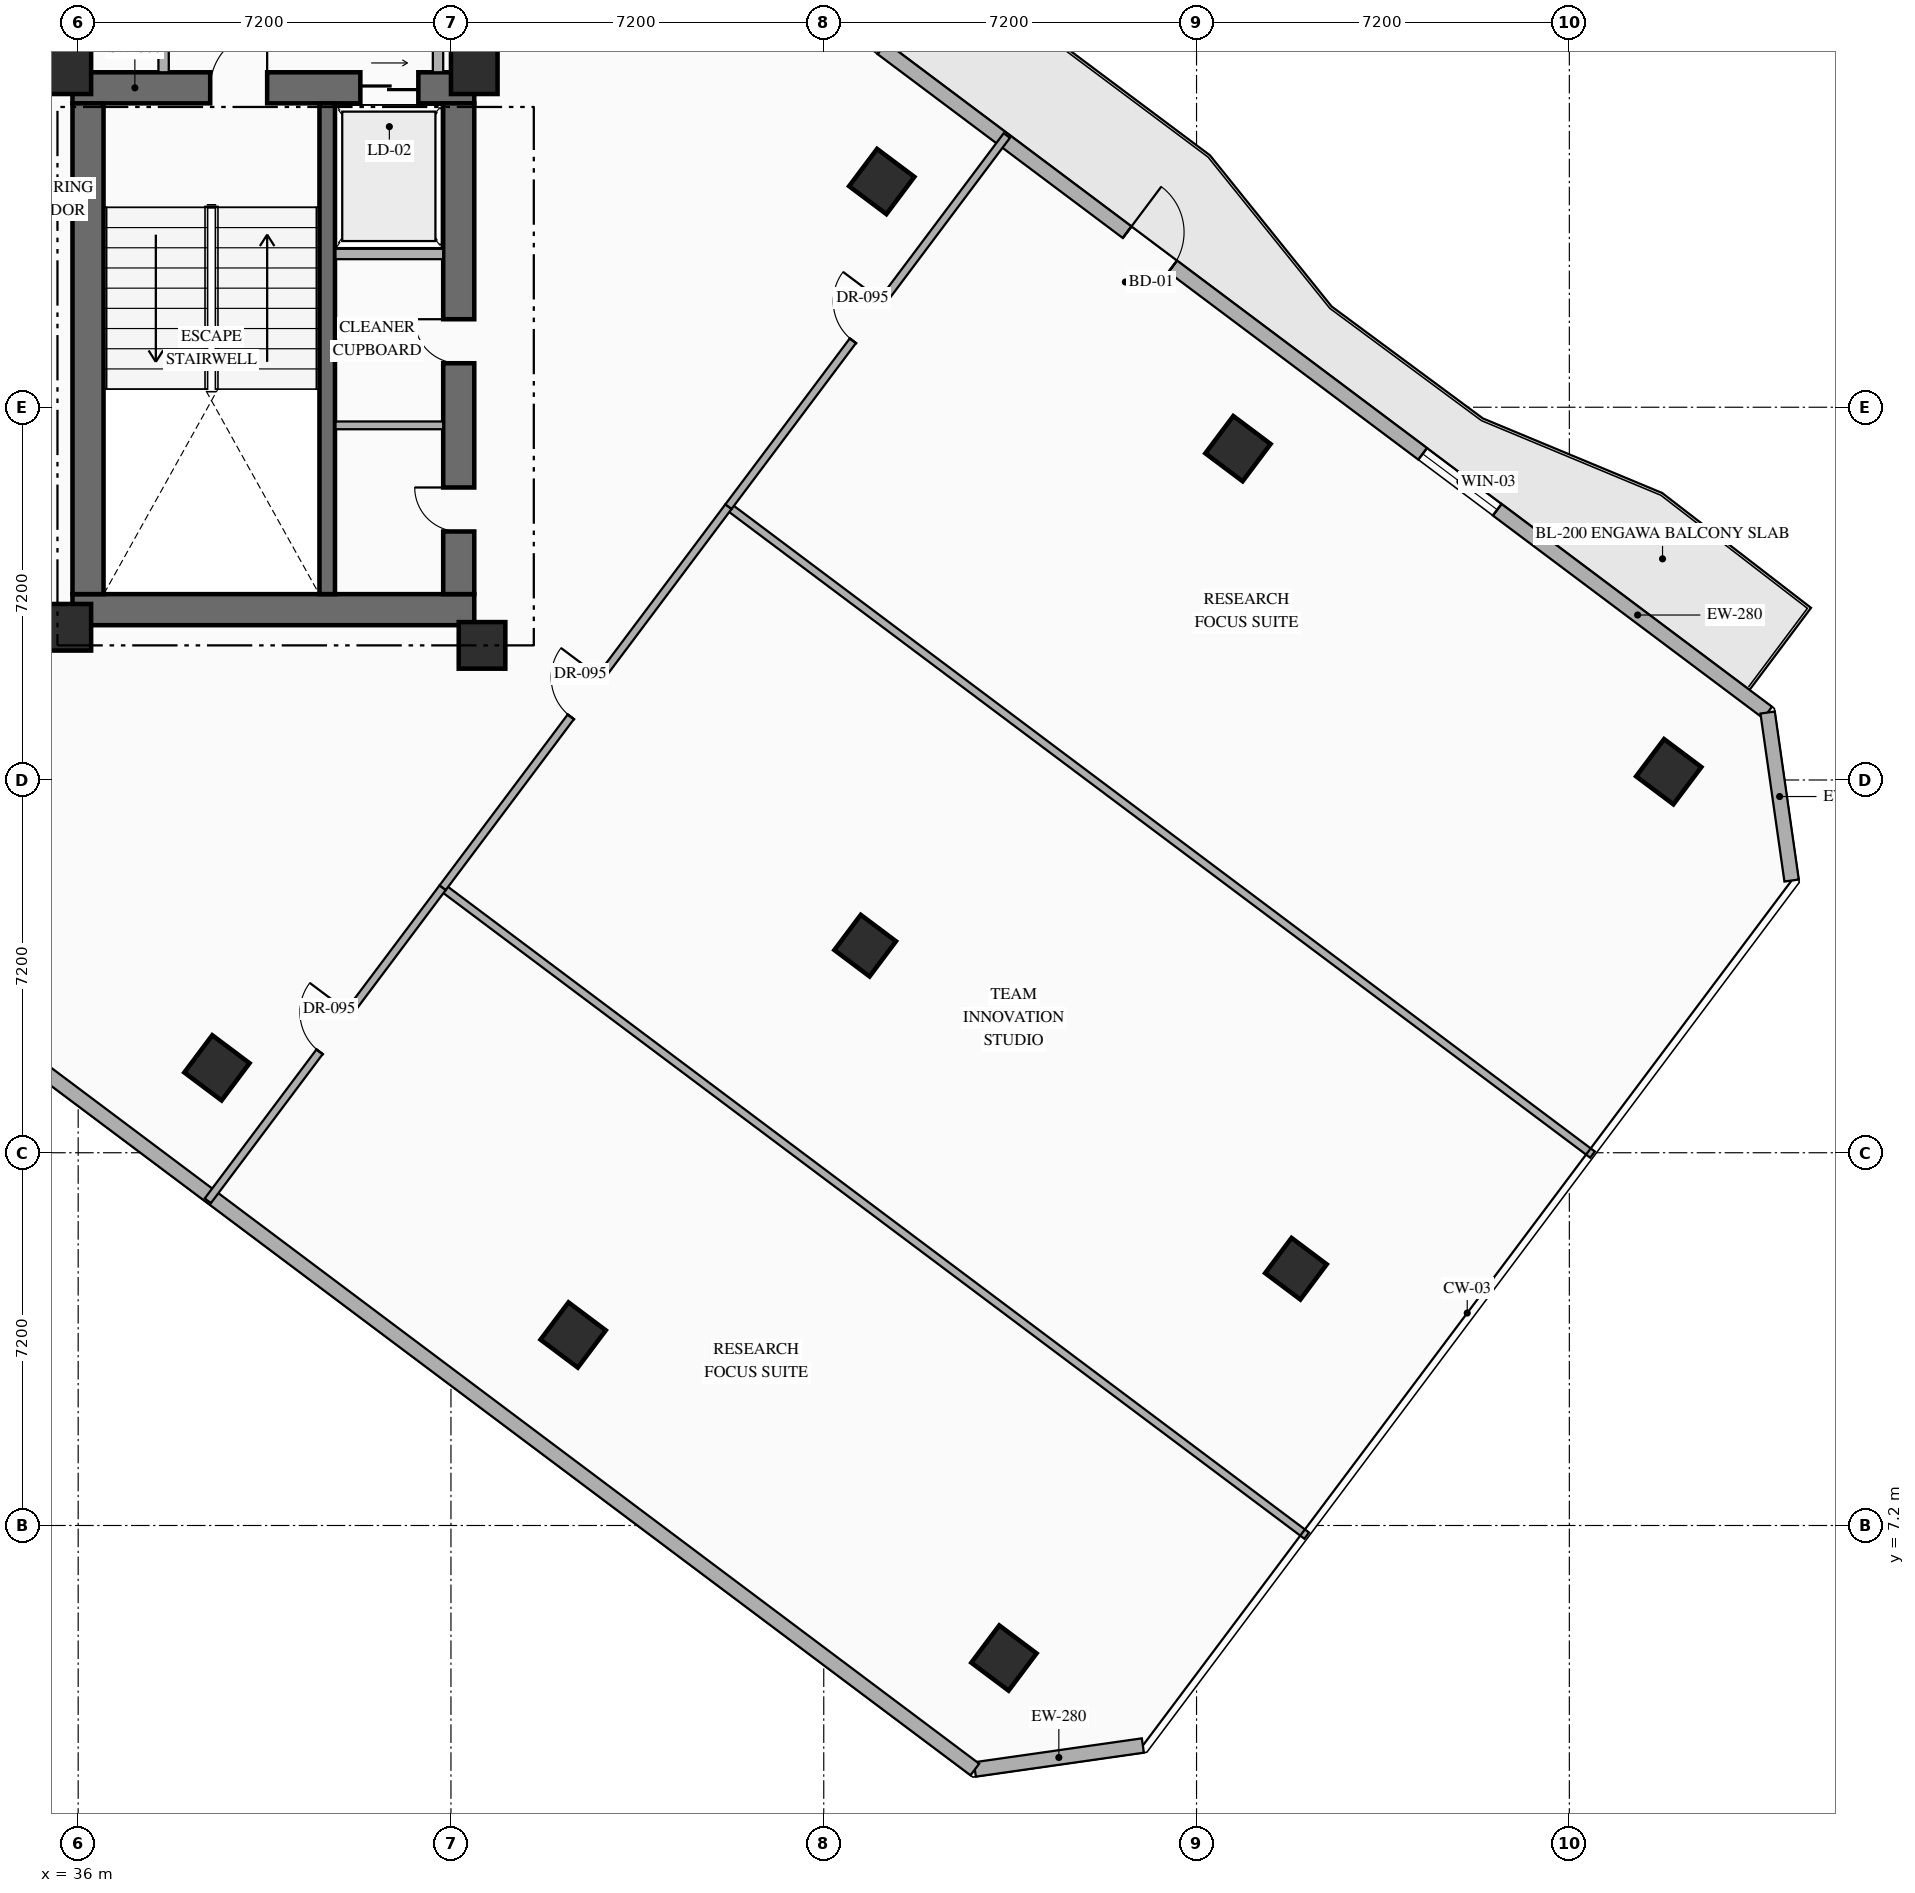
"""IFC4 building model, lengths in metres.
Left out: names, types, materials, properties, quantities, classifications, styles, units other than length and angle.
Written with IfcOpenShell. Run it as: python <this file> out.ifc"""

import sys

from ifc_helpers import new_model, si_unit, direction, frame, frame_2d, origin, origin_2d, place, context, subcontext, project, spatial, rectangle, hollow_rectangle, extrude, element, fill, save


model = new_model("IFC4")
c1 = context("Model", 3, precision=1e-05, world=origin(), true_north=direction((0.0, 1.0)))
c2 = subcontext(c1, "Body", "Model", "MODEL_VIEW")
j1 = project(units=[si_unit("LENGTHUNIT", "METRE"), si_unit("PLANEANGLEUNIT", "RADIAN")], contexts=[c1])
p1 = place(None, origin())
s1 = spatial("IfcSite", under=j1, at=p1, CompositionType="ELEMENT")
p2 = place(p1, origin())
s2 = spatial("IfcBuilding", under=s1, at=p2, CompositionType="ELEMENT")
p3 = place(p2, frame((0.0, 0.0, 101.25)))
s3 = spatial("IfcBuildingStorey", under=s2, at=p3, CompositionType="ELEMENT", Elevation=101.25)
p4 = place(p3, frame((35.89, 24.89, 0.0), z_axis=(0.0, 0.0, 1.0), x_axis=(1.0, 0.0, 0.0)))
e1 = element("IfcWall", 1, at=p4, inside=s3, PredefinedType="SHEAR", context=c2, shape_type="SweptSolid", body=[
    extrude(rectangle(XDim=7.76, YDim=0.6, at=frame_2d((3.88, 0.0))), origin(), (0.0, 0.0, 1.0), 3.6),
])
p5 = place(p3, frame((35.89, 34.97, 0.0), z_axis=(0.0, 0.0, 1.0), x_axis=(1.0, 0.0, 0.0)))
e2 = element("IfcWall", 2, at=p5, inside=s3, PredefinedType="SHEAR", context=c2, shape_type="SweptSolid", body=[
    extrude(rectangle(XDim=7.76, YDim=0.6, at=frame_2d((3.88, 0.0))), origin(), (0.0, 0.0, 1.0), 3.6),
])
p6 = place(p5, frame((2.66, 0.0, 0.0)))
e3 = element("IfcOpeningElement", 3, at=p6, cuts=e2, PredefinedType="OPENING", context=c2, shape_type="SweptSolid", body=[
    extrude(rectangle(XDim=1.1, YDim=2.2, at=frame_2d((0.55, 1.1))), frame((0.0, 0.31, 0.0), z_axis=(0.0, -1.0, 0.0), x_axis=(1.0, 0.0, 0.0)), (0.0, 0.0, 1.0), 0.62),
])
p7 = place(p5, frame((5.56, 0.0, 0.0)))
e4 = element("IfcOpeningElement", 4, at=p7, cuts=e2, PredefinedType="OPENING", context=c2, shape_type="SweptSolid", body=[
    extrude(rectangle(XDim=1.12, YDim=2.15, at=frame_2d((0.56, 1.075))), frame((0.0, 0.31, 0.0), z_axis=(0.0, -1.0, 0.0), x_axis=(1.0, 0.0, 0.0)), (0.0, 0.0, 1.0), 0.62),
])
p8 = place(p3, frame((36.19, 25.19, 0.0), z_axis=(0.0, 0.0, 1.0), x_axis=(0.0, 1.0, 0.0)))
e5 = element("IfcWall", 5, at=p8, inside=s3, PredefinedType="SHEAR", context=c2, shape_type="SweptSolid", body=[
    extrude(rectangle(XDim=9.48, YDim=0.6, at=frame_2d((4.74, 0.0))), origin(), (0.0, 0.0, 1.0), 3.6),
])
p9 = place(p3, frame((43.35, 25.19, 0.0), z_axis=(0.0, 0.0, 1.0), x_axis=(0.0, 1.0, 0.0)))
e6 = element("IfcWall", 6, at=p9, inside=s3, PredefinedType="SHEAR", context=c2, shape_type="SweptSolid", body=[
    extrude(rectangle(XDim=9.48, YDim=0.6, at=frame_2d((4.74, 0.0))), origin(), (0.0, 0.0, 1.0), 3.6),
])
p10 = place(p9, frame((1.21, 0.0, 0.0)))
e7 = element("IfcOpeningElement", 7, at=p10, cuts=e6, PredefinedType="OPENING", context=c2, shape_type="SweptSolid", body=[
    extrude(rectangle(XDim=0.85, YDim=2.08, at=frame_2d((0.425, 1.04))), frame((0.0, 0.31, 0.0), z_axis=(0.0, -1.0, 0.0), x_axis=(1.0, 0.0, 0.0)), (0.0, 0.0, 1.0), 0.62),
])
p11 = place(p9, frame((4.46, 0.0, 0.0)))
e8 = element("IfcOpeningElement", 8, at=p11, cuts=e6, PredefinedType="OPENING", context=c2, shape_type="SweptSolid", body=[
    extrude(rectangle(XDim=0.85, YDim=2.08, at=frame_2d((0.425, 1.04))), frame((0.0, 0.31, 0.0), z_axis=(0.0, -1.0, 0.0), x_axis=(1.0, 0.0, 0.0)), (0.0, 0.0, 1.0), 0.62),
])
p12 = place(p3, frame((40.81, 25.19, 0.0), z_axis=(0.0, 0.0, 1.0), x_axis=(0.0, 1.0, 0.0)))
e9 = element("IfcWall", 9, at=p12, inside=s3, PredefinedType="SHEAR", context=c2, shape_type="SweptSolid", body=[
    extrude(rectangle(XDim=9.48, YDim=0.3, at=frame_2d((4.74, 0.0))), origin(), (0.0, 0.0, 1.0), 3.6),
])
for number, where, z_axis, x_axis in (
    (10, (35.8, 24.55, 0.0), (0.0, 0.0, 1.0), (1.0, 0.0, 0.0)),
    (11, (43.8, 24.2, 0.0), (0.0, 0.0, 1.0), (1.0, 0.0, 0.0)),
    (12, (35.8, 35.3, 0.0), (0.0, 0.0, 1.0), (1.0, 0.0, 0.0)),
    (13, (43.65, 35.3, 0.0), (0.0, 0.0, 1.0), (1.0, 0.0, 0.0)),
):
    element("IfcColumn", number, at=place(p3, frame(where, z_axis=z_axis, x_axis=x_axis)), inside=s3, PredefinedType="COLUMN", context=c2, shape_type="SweptSolid", body=[
        extrude(rectangle(XDim=0.9, YDim=0.9, at=origin_2d()), origin(), (0.0, 0.0, 1.0), 3.6),
    ])
for number, where, z_axis, x_axis in (
    (14, (38.68, 16.04, 0.0), (0.0, 0.0, 1.0), (0.8, -0.6, 0.0)),
    (15, (51.52, 33.16, 0.0), (0.0, 0.0, 1.0), (0.8, -0.6, 0.0)),
    (16, (45.56, 10.88, 0.0), (0.0, 0.0, 1.0), (0.8, -0.6, 0.0)),
    (17, (58.4, 28.0, 0.0), (0.0, 0.0, 1.0), (0.8, -0.6, 0.0)),
):
    element("IfcColumn", number, at=place(p3, frame(where, z_axis=z_axis, x_axis=x_axis)), inside=s3, PredefinedType="COLUMN", context=c2, shape_type="SweptSolid", body=[
        extrude(hollow_rectangle(XDim=0.9, YDim=0.9, WallThickness=0.036, at=origin_2d()), origin(), (0.0, 0.0, 1.0), 3.6),
    ])
p13 = place(p3, frame((51.2, 18.4, 0.0), z_axis=(0.0, 0.0, 1.0), x_axis=(0.799999996291, -0.600000004945, 0.0)))
e18 = element("IfcColumn", 18, at=p13, inside=s3, PredefinedType="COLUMN", context=c2, shape_type="SweptSolid", body=[
    extrude(hollow_rectangle(XDim=0.85, YDim=0.85, WallThickness=0.032, at=origin_2d()), origin(), (0.0, 0.0, 1.0), 3.6),
])
for number, where, z_axis, x_axis in (
    (19, (53.88, 4.64, 0.0), (0.0, 0.0, 1.0), (0.8, -0.6, 0.0)),
    (20, (66.72, 21.76, 0.0), (0.0, 0.0, 1.0), (0.8, -0.6, 0.0)),
):
    element("IfcColumn", number, at=place(p3, frame(where, z_axis=z_axis, x_axis=x_axis)), inside=s3, PredefinedType="COLUMN", context=c2, shape_type="SweptSolid", body=[
        extrude(hollow_rectangle(XDim=0.9, YDim=0.9, WallThickness=0.036, at=origin_2d()), origin(), (0.0, 0.0, 1.0), 3.6),
    ])
p14 = place(p3, frame((59.52, 12.16, 0.0), z_axis=(0.0, 0.0, 1.0), x_axis=(0.799999996291, -0.600000004945, 0.0)))
e21 = element("IfcColumn", 21, at=p14, inside=s3, PredefinedType="COLUMN", context=c2, shape_type="SweptSolid", body=[
    extrude(hollow_rectangle(XDim=0.85, YDim=0.85, WallThickness=0.032, at=origin_2d()), origin(), (0.0, 0.0, 1.0), 3.6),
])
p15 = place(p3, frame((44.86, 40.73, 0.0), z_axis=(0.0, 0.0, 1.0), x_axis=(0.800006902154, -0.599990797017, 0.0)))
e22 = element("IfcWall", 22, at=p15, inside=s3, PredefinedType="STANDARD", context=c2, shape_type="SweptSolid", body=[
    extrude(rectangle(XDim=29.712, YDim=0.28, at=frame_2d((14.856, 0.0))), origin(), (0.0, 0.0, 1.0), 3.35),
])
p16 = place(p15, frame((14.249, 0.0, 0.0)))
e23 = element("IfcOpeningElement", 23, at=p16, cuts=e22, PredefinedType="OPENING", context=c2, shape_type="SweptSolid", body=[
    extrude(rectangle(XDim=1.1, YDim=2.2, at=frame_2d((0.55, 1.1))), frame((0.0, 0.15, 0.0), z_axis=(0.0, -1.0, 0.0), x_axis=(1.0, 0.0, 0.0)), (0.0, 0.0, 1.0), 0.3),
])
p17 = place(p15, frame((6.528, 0.0, 0.85)))
e24 = element("IfcOpeningElement", 24, at=p17, cuts=e22, PredefinedType="OPENING", context=c2, shape_type="SweptSolid", body=[
    extrude(rectangle(XDim=1.8, YDim=2.1, at=frame_2d((0.9, 1.05))), frame((0.0, 0.15, 0.0), z_axis=(0.0, -1.0, 0.0), x_axis=(1.0, 0.0, 0.0)), (0.0, 0.0, 1.0), 0.3),
])
p18 = place(p15, frame((21.384, 0.0, 0.85)))
e25 = element("IfcOpeningElement", 25, at=p18, cuts=e22, PredefinedType="OPENING", context=c2, shape_type="SweptSolid", body=[
    extrude(rectangle(XDim=1.8, YDim=2.1, at=frame_2d((0.9, 1.05))), frame((0.0, 0.15, 0.0), z_axis=(0.0, -1.0, 0.0), x_axis=(1.0, 0.0, 0.0)), (0.0, 0.0, 1.0), 0.3),
])
p19 = place(p3, frame((68.63, 22.903, 0.0), z_axis=(0.0, 0.0, 1.0), x_axis=(0.141285803956, -0.989968848803, 0.0)))
e26 = element("IfcWall", 26, at=p19, inside=s3, PredefinedType="STANDARD", context=c2, shape_type="SweptSolid", body=[
    extrude(rectangle(XDim=3.278, YDim=0.28, at=frame_2d((1.639, 0.0))), origin(), (0.0, 0.0, 1.0), 3.35),
])
p20 = place(p3, frame((56.563, 2.95, 0.0), z_axis=(0.0, 0.0, 1.0), x_axis=(-0.989977778067, -0.141223223777, 0.0)))
e27 = element("IfcWall", 27, at=p20, inside=s3, PredefinedType="STANDARD", context=c2, shape_type="SweptSolid", body=[
    extrude(rectangle(XDim=3.278, YDim=0.28, at=frame_2d((1.639, 0.0))), origin(), (0.0, 0.0, 1.0), 3.35),
])
p21 = place(p3, frame((53.318, 2.487, 0.0), z_axis=(0.0, 0.0, 1.0), x_axis=(-0.800004174678, 0.599994433723, 0.0)))
e28 = element("IfcWall", 28, at=p21, inside=s3, PredefinedType="STANDARD", context=c2, shape_type="SweptSolid", body=[
    extrude(rectangle(XDim=35.089, YDim=0.28, at=frame_2d((17.544, 0.0))), origin(), (0.0, 0.0, 1.0), 3.35),
])
p22 = place(p3, frame((40.97, 31.76, 0.0), z_axis=(0.0, 0.0, 1.0), x_axis=(1.0, 0.0, 0.0)))
e29 = element("IfcWall", 29, at=p22, inside=s3, PredefinedType="STANDARD", context=c2, shape_type="SweptSolid", body=[
    extrude(rectangle(XDim=2.08, YDim=0.2, at=frame_2d((1.04, 0.0))), origin(), (0.0, 0.0, 1.0), 3.35),
])
p23 = place(p3, frame((40.97, 28.45, 0.0), z_axis=(0.0, 0.0, 1.0), x_axis=(1.0, 0.0, 0.0)))
e30 = element("IfcWall", 30, at=p23, inside=s3, PredefinedType="PARTITIONING", context=c2, shape_type="SweptSolid", body=[
    extrude(rectangle(XDim=2.08, YDim=0.15, at=frame_2d((1.04, 0.0))), origin(), (0.0, 0.0, 1.0), 3.35),
])
p24 = place(p3, frame((42.95, 35.27, 0.0), z_axis=(0.0, 0.0, 1.0), x_axis=(0.0, 1.0, 0.0)))
e31 = element("IfcWall", 31, at=p24, inside=s3, PredefinedType="STANDARD", context=c2, shape_type="SweptSolid", body=[
    extrude(rectangle(XDim=2.83, YDim=0.2, at=frame_2d((1.415, 0.0))), origin(), (0.0, 0.0, 1.0), 3.35),
])
p25 = place(p3, frame((37.65, 35.27, 0.0), z_axis=(0.0, 0.0, 1.0), x_axis=(0.0, 1.0, 0.0)))
e32 = element("IfcWall", 32, at=p25, inside=s3, PredefinedType="STANDARD", context=c2, shape_type="SweptSolid", body=[
    extrude(rectangle(XDim=2.83, YDim=0.2, at=frame_2d((1.415, 0.0))), origin(), (0.0, 0.0, 1.0), 3.35),
])
p26 = place(p25, frame((0.915, 0.0, 0.0)))
e33 = element("IfcOpeningElement", 33, at=p26, cuts=e32, PredefinedType="OPENING", context=c2, shape_type="SweptSolid", body=[
    extrude(rectangle(XDim=1.0, YDim=2.2, at=frame_2d((0.5, 1.1))), frame((0.0, 0.11, 0.0), z_axis=(0.0, -1.0, 0.0), x_axis=(1.0, 0.0, 0.0)), (0.0, 0.0, 1.0), 0.22),
])
p27 = place(p3, frame((43.04, 19.52, 0.0), z_axis=(0.0, 0.0, 1.0), x_axis=(0.799997191095, -0.600003745189, 0.0)))
e34 = element("IfcWall", 34, at=p27, inside=s3, PredefinedType="PARTITIONING", context=c2, shape_type="SweptSolid", body=[
    extrude(rectangle(XDim=20.86, YDim=0.15, at=frame_2d((10.43, 0.0))), origin(), (0.0, 0.0, 1.0), 3.35),
])
p28 = place(p3, frame((38.504, 13.472, 0.0), z_axis=(0.0, 0.0, 1.0), x_axis=(0.600005166878, 0.799996124815, 0.0)))
e35 = element("IfcWall", 35, at=p28, inside=s3, PredefinedType="PARTITIONING", context=c2, shape_type="SweptSolid", body=[
    extrude(rectangle(XDim=7.56, YDim=0.15, at=frame_2d((3.78, 0.0))), origin(), (0.0, 0.0, 1.0), 3.35),
])
p29 = place(p28, frame((3.598, 0.0, 0.0)))
e36 = element("IfcOpeningElement", 36, at=p29, cuts=e35, PredefinedType="OPENING", context=c2, shape_type="SweptSolid", body=[
    extrude(rectangle(XDim=0.95, YDim=2.15, at=frame_2d((0.475, 1.075))), frame((0.0, 0.085, 0.0), z_axis=(0.0, -1.0, 0.0), x_axis=(1.0, 0.0, 0.0)), (0.0, 0.0, 1.0), 0.17),
])
p30 = place(p3, frame((48.56, 26.88, 0.0), z_axis=(0.0, 0.0, 1.0), x_axis=(0.800002808908, -0.599996254772, 0.0)))
e37 = element("IfcWall", 37, at=p30, inside=s3, PredefinedType="PARTITIONING", context=c2, shape_type="SweptSolid", body=[
    extrude(rectangle(XDim=20.86, YDim=0.15, at=frame_2d((10.43, 0.0))), origin(), (0.0, 0.0, 1.0), 2.995),
])
p31 = place(p3, frame((43.04, 19.52, 0.0), z_axis=(0.0, 0.0, 1.0), x_axis=(0.600008491904, 0.799993631001, 0.0)))
e38 = element("IfcWall", 38, at=p31, inside=s3, PredefinedType="PARTITIONING", context=c2, shape_type="SweptSolid", body=[
    extrude(rectangle(XDim=9.2, YDim=0.15, at=frame_2d((4.6, 0.0))), origin(), (0.0, 0.0, 1.0), 3.35),
])
p32 = place(p31, frame((4.125, 0.0, 0.0)))
e39 = element("IfcOpeningElement", 39, at=p32, cuts=e38, PredefinedType="OPENING", context=c2, shape_type="SweptSolid", body=[
    extrude(rectangle(XDim=0.95, YDim=2.15, at=frame_2d((0.475, 1.075))), frame((0.0, 0.085, 0.0), z_axis=(0.0, -1.0, 0.0), x_axis=(1.0, 0.0, 0.0)), (0.0, 0.0, 1.0), 0.17),
])
p33 = place(p3, frame((48.56, 26.88, 0.0), z_axis=(0.0, 0.0, 1.0), x_axis=(0.599986921186, 0.800009808944, 0.0)))
e40 = element("IfcWall", 40, at=p33, inside=s3, PredefinedType="PARTITIONING", context=c2, shape_type="SweptSolid", body=[
    extrude(rectangle(XDim=8.96, YDim=0.15, at=frame_2d((4.48, 0.0))), origin(), (0.0, 0.0, 1.0), 3.35),
])
p34 = place(p33, frame((4.005, 0.0, 0.0)))
e41 = element("IfcOpeningElement", 41, at=p34, cuts=e40, PredefinedType="OPENING", context=c2, shape_type="SweptSolid", body=[
    extrude(rectangle(XDim=0.95, YDim=2.15, at=frame_2d((0.475, 1.075))), frame((0.0, 0.085, 0.0), z_axis=(0.0, -1.0, 0.0), x_axis=(1.0, 0.0, 0.0)), (0.0, 0.0, 1.0), 0.17),
])
p35 = place(p16, origin())
e42 = element("IfcDoor", 42, at=p35, inside=s3, OperationType="SINGLE_SWING_LEFT", PredefinedType="DOOR", context=c2, shape_type="SweptSolid", body=[
    extrude(rectangle(XDim=1.1, YDim=2.2, at=frame_2d((0.55, 1.1))), frame((0.0, 0.025, 0.0), z_axis=(0.0, -1.0, 0.0), x_axis=(1.0, 0.0, 0.0)), (0.0, 0.0, 1.0), 0.05),
])
fill(e23, e42)
p36 = place(p18, origin())
e43 = element("IfcWindow", 43, at=p36, inside=s3, PartitioningType="SINGLE_PANEL", PredefinedType="WINDOW", context=c2, shape_type="SweptSolid", body=[
    extrude(rectangle(XDim=1.8, YDim=2.1, at=frame_2d((0.9, 1.05))), frame((0.0, 0.03, 0.0), z_axis=(0.0, -1.0, 0.0), x_axis=(1.0, 0.0, 0.0)), (0.0, 0.0, 1.0), 0.06),
])
fill(e25, e43)
p37 = place(p6, origin())
e44 = element("IfcDoor", 44, at=p37, inside=s3, OperationType="SINGLE_SWING_RIGHT", PredefinedType="DOOR", context=c2, shape_type="SweptSolid", body=[
    extrude(rectangle(XDim=1.1, YDim=2.2, at=frame_2d((0.55, 1.1))), frame((0.0, 0.025, 0.0), z_axis=(0.0, -1.0, 0.0), x_axis=(1.0, 0.0, 0.0)), (0.0, 0.0, 1.0), 0.05),
])
fill(e3, e44)
p38 = place(p7, origin())
e45 = element("IfcDoor", 45, at=p38, inside=s3, OperationType="SLIDING_TO_RIGHT", PredefinedType="USERDEFINED", context=c2, shape_type="SweptSolid", body=[
    extrude(rectangle(XDim=1.12, YDim=2.15, at=frame_2d((0.56, 1.075))), frame((0.0, 0.025, 0.0), z_axis=(0.0, -1.0, 0.0), x_axis=(1.0, 0.0, 0.0)), (0.0, 0.0, 1.0), 0.05),
])
fill(e4, e45)
p39 = place(p10, origin())
e46 = element("IfcDoor", 46, at=p39, inside=s3, OperationType="SINGLE_SWING_RIGHT", PredefinedType="DOOR", context=c2, shape_type="SweptSolid", body=[
    extrude(rectangle(XDim=0.85, YDim=2.08, at=frame_2d((0.425, 1.04))), frame((0.0, 0.025, 0.0), z_axis=(0.0, -1.0, 0.0), x_axis=(1.0, 0.0, 0.0)), (0.0, 0.0, 1.0), 0.05),
])
fill(e7, e46)
p40 = place(p11, origin())
e47 = element("IfcDoor", 47, at=p40, inside=s3, OperationType="SINGLE_SWING_RIGHT", PredefinedType="DOOR", context=c2, shape_type="SweptSolid", body=[
    extrude(rectangle(XDim=0.85, YDim=2.08, at=frame_2d((0.425, 1.04))), frame((0.0, 0.025, 0.0), z_axis=(0.0, -1.0, 0.0), x_axis=(1.0, 0.0, 0.0)), (0.0, 0.0, 1.0), 0.05),
])
fill(e8, e47)
p41 = place(p29, origin())
e48 = element("IfcDoor", 48, at=p41, inside=s3, OperationType="SINGLE_SWING_RIGHT", PredefinedType="DOOR", context=c2, shape_type="SweptSolid", body=[
    extrude(rectangle(XDim=0.95, YDim=2.15, at=frame_2d((0.475, 1.075))), frame((0.0, 0.025, 0.0), z_axis=(0.0, -1.0, 0.0), x_axis=(1.0, 0.0, 0.0)), (0.0, 0.0, 1.0), 0.05),
])
fill(e36, e48)
p42 = place(p32, origin())
e49 = element("IfcDoor", 49, at=p42, inside=s3, OperationType="SINGLE_SWING_RIGHT", PredefinedType="DOOR", context=c2, shape_type="SweptSolid", body=[
    extrude(rectangle(XDim=0.95, YDim=2.15, at=frame_2d((0.475, 1.075))), frame((0.0, 0.025, 0.0), z_axis=(0.0, -1.0, 0.0), x_axis=(1.0, 0.0, 0.0)), (0.0, 0.0, 1.0), 0.05),
])
fill(e39, e49)
p43 = place(p34, origin())
e50 = element("IfcDoor", 50, at=p43, inside=s3, OperationType="SINGLE_SWING_RIGHT", PredefinedType="DOOR", context=c2, shape_type="SweptSolid", body=[
    extrude(rectangle(XDim=0.95, YDim=2.15, at=frame_2d((0.475, 1.075))), frame((0.0, 0.025, 0.0), z_axis=(0.0, -1.0, 0.0), x_axis=(1.0, 0.0, 0.0)), (0.0, 0.0, 1.0), 0.05),
])
fill(e41, e50)
save(model, sys.argv[1])
